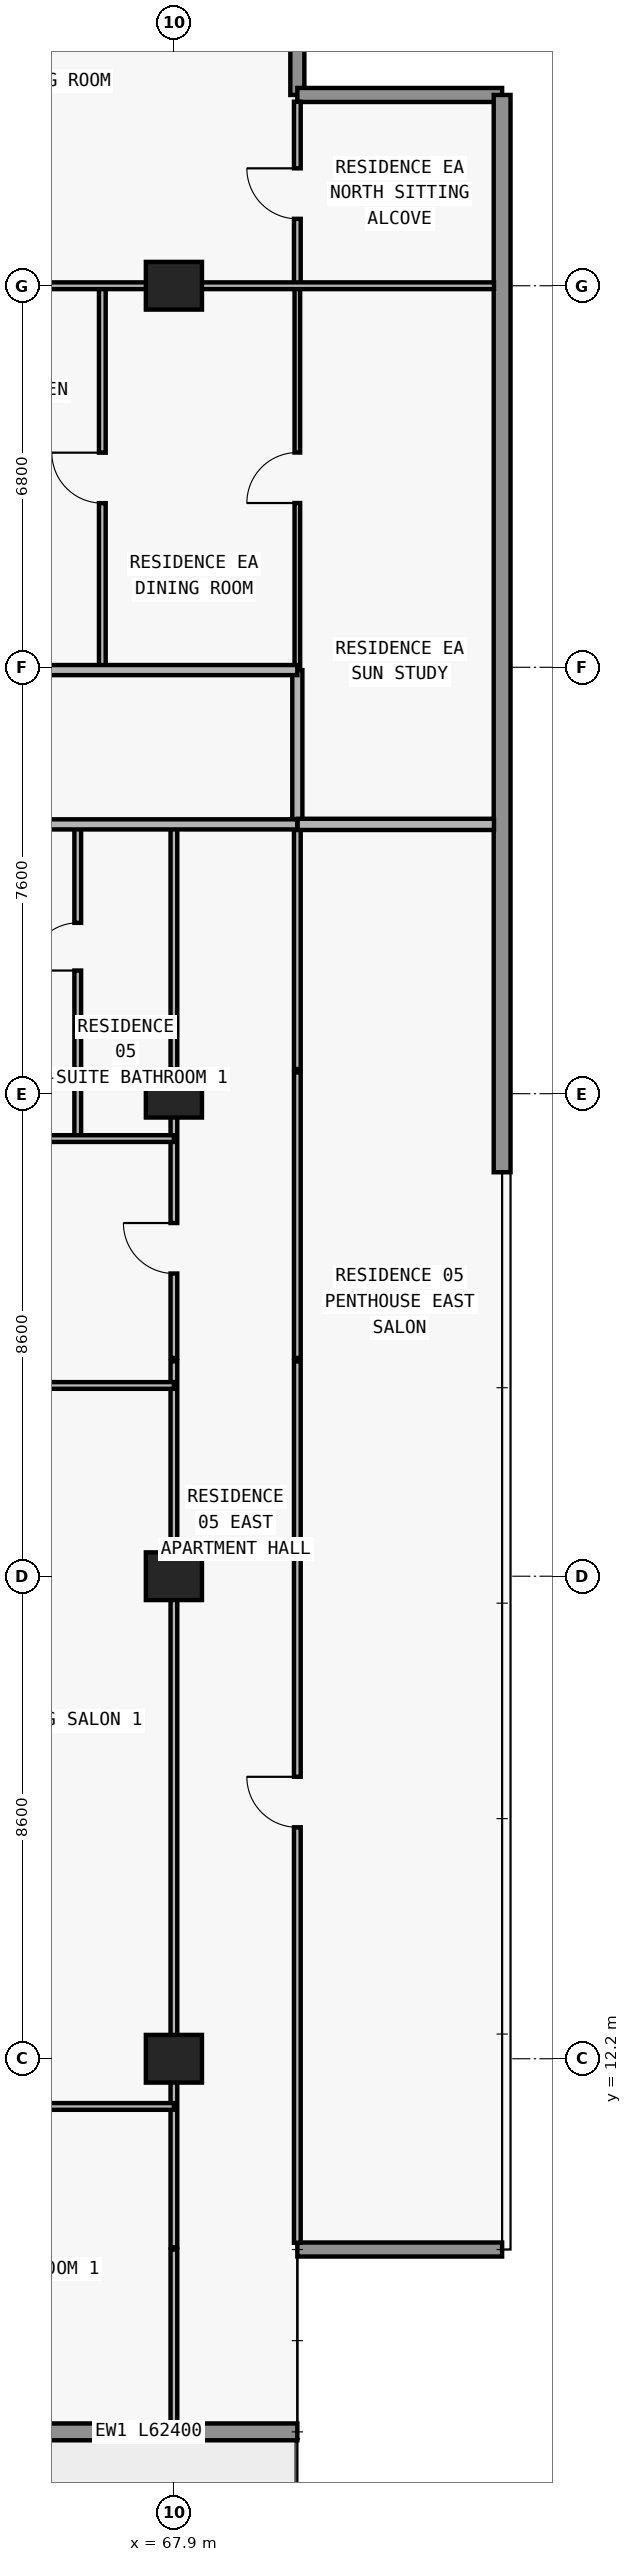
"""IFC4 building model, lengths in metres.
Left out: names, types, materials, properties, quantities, classifications, styles, units other than length and angle.
Written with IfcOpenShell. Run it as: python <this file> out.ifc"""

import sys

from ifc_helpers import new_model, si_unit, direction, frame, frame_2d, origin, origin_2d, place, context, subcontext, project, spatial, rectangle, extrude, element, fill, save


model = new_model("IFC4")
c1 = context("Model", 3, precision=1e-05, world=origin(), true_north=direction((0.0, 1.0)))
c2 = subcontext(c1, "Body", "Model", "MODEL_VIEW")
j1 = project(units=[si_unit("LENGTHUNIT", "METRE"), si_unit("PLANEANGLEUNIT", "RADIAN")], contexts=[c1])
p1 = place(None, origin())
s1 = spatial("IfcSite", under=j1, at=p1, CompositionType="ELEMENT")
p2 = place(p1, origin())
s2 = spatial("IfcBuilding", under=s1, at=p2, CompositionType="ELEMENT")
p3 = place(p2, frame((0.0, 0.0, 148.8)))
s3 = spatial("IfcBuildingStorey", under=s2, at=p3, CompositionType="ELEMENT", Elevation=148.8)
for number, where, z_axis, x_axis in (
    (1, (67.9, 12.2, 0.0), (0.0, 0.0, 1.0), (1.0, 0.0, 0.0)),
    (2, (67.9, 20.8, 0.0), (0.0, 0.0, 1.0), (1.0, 0.0, 0.0)),
    (3, (67.9, 29.4, 0.0), (0.0, 0.0, 1.0), (1.0, 0.0, 0.0)),
    (4, (67.9, 43.8, 0.0), (0.0, 0.0, 1.0), (1.0, 0.0, 0.0)),
):
    element("IfcColumn", number, at=place(p3, frame(where, z_axis=z_axis, x_axis=x_axis)), inside=s3, PredefinedType="COLUMN", context=c2, shape_type="SweptSolid", body=[
        extrude(rectangle(XDim=1.0, YDim=0.85, at=origin_2d()), origin(), (0.0, 0.0, 1.0), 3.0),
    ])
p4 = place(p3, frame((70.1, 5.55, 0.0), z_axis=(0.0, 0.0, 1.0), x_axis=(-1.0, 0.0, 0.0)))
e5 = element("IfcWall", 5, at=p4, inside=s3, PredefinedType="STANDARD", context=c2, shape_type="SweptSolid", body=[
    extrude(rectangle(XDim=62.4, YDim=0.3, at=frame_2d((31.2, 0.0))), origin(), (0.0, 0.0, 1.0), 3.0),
])
p5 = place(p4, frame((57.226, 0.0, 0.0)))
e6 = element("IfcOpeningElement", 6, at=p5, cuts=e5, PredefinedType="OPENING", context=c2, shape_type="SweptSolid", body=[
    extrude(rectangle(XDim=2.0, YDim=2.3, at=frame_2d((1.0, 1.15))), frame((0.0, 0.16, 0.0), z_axis=(0.0, -1.0, 0.0), x_axis=(1.0, 0.0, 0.0)), (0.0, 0.0, 1.0), 0.32),
])
p6 = place(p4, frame((52.926, 0.0, 0.85)))
e7 = element("IfcOpeningElement", 7, at=p6, cuts=e5, PredefinedType="OPENING", context=c2, shape_type="SweptSolid", body=[
    extrude(rectangle(XDim=2.2, YDim=1.55, at=frame_2d((1.1, 0.775))), frame((0.0, 0.16, 0.0), z_axis=(0.0, -1.0, 0.0), x_axis=(1.0, 0.0, 0.0)), (0.0, 0.0, 1.0), 0.32),
])
p7 = place(p4, frame((48.49, 0.0, 0.0)))
e8 = element("IfcOpeningElement", 8, at=p7, cuts=e5, PredefinedType="OPENING", context=c2, shape_type="SweptSolid", body=[
    extrude(rectangle(XDim=2.0, YDim=2.3, at=frame_2d((1.0, 1.15))), frame((0.0, 0.16, 0.0), z_axis=(0.0, -1.0, 0.0), x_axis=(1.0, 0.0, 0.0)), (0.0, 0.0, 1.0), 0.32),
])
p8 = place(p4, frame((44.39, 0.0, 0.85)))
e9 = element("IfcOpeningElement", 9, at=p8, cuts=e5, PredefinedType="OPENING", context=c2, shape_type="SweptSolid", body=[
    extrude(rectangle(XDim=1.8, YDim=1.55, at=frame_2d((0.9, 0.775))), frame((0.0, 0.16, 0.0), z_axis=(0.0, -1.0, 0.0), x_axis=(1.0, 0.0, 0.0)), (0.0, 0.0, 1.0), 0.32),
])
p9 = place(p4, frame((40.426, 0.0, 0.0)))
e10 = element("IfcOpeningElement", 10, at=p9, cuts=e5, PredefinedType="OPENING", context=c2, shape_type="SweptSolid", body=[
    extrude(rectangle(XDim=2.0, YDim=2.3, at=frame_2d((1.0, 1.15))), frame((0.0, 0.16, 0.0), z_axis=(0.0, -1.0, 0.0), x_axis=(1.0, 0.0, 0.0)), (0.0, 0.0, 1.0), 0.32),
])
p10 = place(p4, frame((36.126, 0.0, 0.85)))
e11 = element("IfcOpeningElement", 11, at=p10, cuts=e5, PredefinedType="OPENING", context=c2, shape_type="SweptSolid", body=[
    extrude(rectangle(XDim=2.2, YDim=1.55, at=frame_2d((1.1, 0.775))), frame((0.0, 0.16, 0.0), z_axis=(0.0, -1.0, 0.0), x_axis=(1.0, 0.0, 0.0)), (0.0, 0.0, 1.0), 0.32),
])
p11 = place(p4, frame((32.09, 0.0, 0.0)))
e12 = element("IfcOpeningElement", 12, at=p11, cuts=e5, PredefinedType="OPENING", context=c2, shape_type="SweptSolid", body=[
    extrude(rectangle(XDim=2.0, YDim=2.3, at=frame_2d((1.0, 1.15))), frame((0.0, 0.16, 0.0), z_axis=(0.0, -1.0, 0.0), x_axis=(1.0, 0.0, 0.0)), (0.0, 0.0, 1.0), 0.32),
])
p12 = place(p4, frame((28.21, 0.0, 0.65)))
e13 = element("IfcOpeningElement", 13, at=p12, cuts=e5, PredefinedType="OPENING", context=c2, shape_type="SweptSolid", body=[
    extrude(rectangle(XDim=2.6, YDim=1.85, at=frame_2d((1.3, 0.925))), frame((0.0, 0.16, 0.0), z_axis=(0.0, -1.0, 0.0), x_axis=(1.0, 0.0, 0.0)), (0.0, 0.0, 1.0), 0.32),
])
p13 = place(p4, frame((22.1, 0.0, 0.85)))
e14 = element("IfcOpeningElement", 14, at=p13, cuts=e5, PredefinedType="OPENING", context=c2, shape_type="SweptSolid", body=[
    extrude(rectangle(XDim=2.2, YDim=1.55, at=frame_2d((1.1, 0.775))), frame((0.0, 0.16, 0.0), z_axis=(0.0, -1.0, 0.0), x_axis=(1.0, 0.0, 0.0)), (0.0, 0.0, 1.0), 0.32),
])
p14 = place(p4, frame((16.09, 0.0, 0.0)))
e15 = element("IfcOpeningElement", 15, at=p14, cuts=e5, PredefinedType="OPENING", context=c2, shape_type="SweptSolid", body=[
    extrude(rectangle(XDim=2.0, YDim=2.3, at=frame_2d((1.0, 1.15))), frame((0.0, 0.16, 0.0), z_axis=(0.0, -1.0, 0.0), x_axis=(1.0, 0.0, 0.0)), (0.0, 0.0, 1.0), 0.32),
])
p15 = place(p4, frame((11.41, 0.0, 0.65)))
e16 = element("IfcOpeningElement", 16, at=p15, cuts=e5, PredefinedType="OPENING", context=c2, shape_type="SweptSolid", body=[
    extrude(rectangle(XDim=2.6, YDim=1.85, at=frame_2d((1.3, 0.925))), frame((0.0, 0.16, 0.0), z_axis=(0.0, -1.0, 0.0), x_axis=(1.0, 0.0, 0.0)), (0.0, 0.0, 1.0), 0.32),
])
p16 = place(p4, frame((5.3, 0.0, 0.85)))
e17 = element("IfcOpeningElement", 17, at=p16, cuts=e5, PredefinedType="OPENING", context=c2, shape_type="SweptSolid", body=[
    extrude(rectangle(XDim=2.2, YDim=1.55, at=frame_2d((1.1, 0.775))), frame((0.0, 0.16, 0.0), z_axis=(0.0, -1.0, 0.0), x_axis=(1.0, 0.0, 0.0)), (0.0, 0.0, 1.0), 0.32),
])
p17 = place(p3, frame((70.1, 8.8, 0.0), z_axis=(0.0, 0.0, 1.0), x_axis=(1.0, 0.0, 0.0)))
e18 = element("IfcWall", 18, at=p17, inside=s3, PredefinedType="ELEMENTEDWALL", context=c2, shape_type="SweptSolid", body=[
    extrude(rectangle(XDim=3.65, YDim=0.25, at=frame_2d((1.825, 0.0))), origin(), (0.0, 0.0, 1.0), 3.0),
])
p18 = place(p3, frame((70.1, 50.45, 0.0), z_axis=(0.0, 0.0, 1.0), x_axis=(0.0, -1.0, 0.0)))
e19 = element("IfcWall", 19, at=p18, inside=s3, PredefinedType="ELEMENTEDWALL", context=c2, shape_type="SweptSolid", body=[
    extrude(rectangle(XDim=3.25, YDim=0.25, at=frame_2d((1.625, 0.0))), origin(), (0.0, 0.0, 1.0), 3.0),
])
p19 = place(p3, frame((70.1, 47.2, 0.0), z_axis=(0.0, 0.0, 1.0), x_axis=(1.0, 0.0, 0.0)))
e20 = element("IfcWall", 20, at=p19, inside=s3, PredefinedType="ELEMENTEDWALL", context=c2, shape_type="SweptSolid", body=[
    extrude(rectangle(XDim=3.65, YDim=0.25, at=frame_2d((1.825, 0.0))), origin(), (0.0, 0.0, 1.0), 3.0),
])
p20 = place(p3, frame((73.75, 47.2, 0.0), z_axis=(0.0, 0.0, 1.0), x_axis=(0.0, -1.0, 0.0)))
e21 = element("IfcWall", 21, at=p20, inside=s3, PredefinedType="STANDARD", context=c2, shape_type="SweptSolid", body=[
    extrude(rectangle(XDim=19.2, YDim=0.3, at=frame_2d((9.6, 0.0))), origin(), (0.0, 0.0, 1.0), 3.0),
])
p21 = place(p3, frame((66.186, 28.6, 0.0), z_axis=(0.0, 0.0, 1.0), x_axis=(0.0, 1.0, 0.0)))
e22 = element("IfcWall", 22, at=p21, inside=s3, PredefinedType="PARTITIONING", context=c2, shape_type="SweptSolid", body=[
    extrude(rectangle(XDim=1.18, YDim=0.12, at=frame_2d((0.59, 0.0))), origin(), (0.0, 0.0, 1.0), 3.0),
])
p22 = place(p3, frame((66.186, 29.84, 0.0), z_axis=(0.0, 0.0, 1.0), x_axis=(0.0, 1.0, 0.0)))
e23 = element("IfcWall", 23, at=p22, inside=s3, PredefinedType="PARTITIONING", context=c2, shape_type="SweptSolid", body=[
    extrude(rectangle(XDim=4.36, YDim=0.12, at=frame_2d((2.18, 0.0))), origin(), (0.0, 0.0, 1.0), 3.0),
])
p23 = place(p22, frame((1.755, 0.0, 0.0)))
e24 = element("IfcOpeningElement", 24, at=p23, cuts=e23, PredefinedType="OPENING", context=c2, shape_type="SweptSolid", body=[
    extrude(rectangle(XDim=0.85, YDim=2.1, at=frame_2d((0.425, 1.05))), frame((0.0, 0.07, 0.0), z_axis=(0.0, -1.0, 0.0), x_axis=(1.0, 0.0, 0.0)), (0.0, 0.0, 1.0), 0.14),
])
p24 = place(p3, frame((66.624, 36.95, 0.0), z_axis=(0.0, 0.0, 1.0), x_axis=(0.0, 1.0, 0.0)))
e25 = element("IfcWall", 25, at=p24, inside=s3, PredefinedType="PARTITIONING", context=c2, shape_type="SweptSolid", body=[
    extrude(rectangle(XDim=6.85, YDim=0.12, at=frame_2d((3.425, 0.0))), origin(), (0.0, 0.0, 1.0), 3.0),
])
p25 = place(p24, frame((2.975, 0.0, 0.0)))
e26 = element("IfcOpeningElement", 26, at=p25, cuts=e25, PredefinedType="OPENING", context=c2, shape_type="SweptSolid", body=[
    extrude(rectangle(XDim=0.9, YDim=2.15, at=frame_2d((0.45, 1.075))), frame((0.0, 0.07, 0.0), z_axis=(0.0, -1.0, 0.0), x_axis=(1.0, 0.0, 0.0)), (0.0, 0.0, 1.0), 0.14),
])
p26 = place(p3, frame((67.9, 5.695, 0.0), z_axis=(0.0, 0.0, 1.0), x_axis=(0.0, 1.0, 0.0)))
e27 = element("IfcWall", 27, at=p26, inside=s3, PredefinedType="PARTITIONING", context=c2, shape_type="SweptSolid", body=[
    extrude(rectangle(XDim=3.105, YDim=0.12, at=frame_2d((1.552, 0.0))), origin(), (0.0, 0.0, 1.0), 3.0),
])
p27 = place(p3, frame((67.9, 8.84, 0.0), z_axis=(0.0, 0.0, 1.0), x_axis=(0.0, 1.0, 0.0)))
e28 = element("IfcWall", 28, at=p27, inside=s3, PredefinedType="PARTITIONING", context=c2, shape_type="SweptSolid", body=[
    extrude(rectangle(XDim=15.79, YDim=0.12, at=frame_2d((7.895, 0.0))), origin(), (0.0, 0.0, 1.0), 2.124),
])
p28 = place(p3, frame((67.9, 24.69, 0.0), z_axis=(0.0, 0.0, 1.0), x_axis=(0.0, 1.0, 0.0)))
e29 = element("IfcWall", 29, at=p28, inside=s3, PredefinedType="PARTITIONING", context=c2, shape_type="SweptSolid", body=[
    extrude(rectangle(XDim=5.09, YDim=0.12, at=frame_2d((2.545, 0.0))), origin(), (0.0, 0.0, 1.0), 2.124),
])
p29 = place(p28, frame((1.505, 0.0, 0.0)))
e30 = element("IfcOpeningElement", 30, at=p29, cuts=e29, PredefinedType="OPENING", context=c2, shape_type="SweptSolid", body=[
    extrude(rectangle(XDim=0.9, YDim=2.074, at=frame_2d((0.45, 1.037))), frame((0.0, 0.07, 0.0), z_axis=(0.0, -1.0, 0.0), x_axis=(1.0, 0.0, 0.0)), (0.0, 0.0, 1.0), 0.14),
])
p30 = place(p3, frame((67.9, 29.84, 0.0), z_axis=(0.0, 0.0, 1.0), x_axis=(0.0, 1.0, 0.0)))
e31 = element("IfcWall", 31, at=p30, inside=s3, PredefinedType="PARTITIONING", context=c2, shape_type="SweptSolid", body=[
    extrude(rectangle(XDim=4.36, YDim=0.12, at=frame_2d((2.18, 0.0))), origin(), (0.0, 0.0, 1.0), 2.124),
])
p31 = place(p3, frame((70.1, 8.92, 0.0), z_axis=(0.0, 0.0, 1.0), x_axis=(0.0, 1.0, 0.0)))
e32 = element("IfcWall", 32, at=p31, inside=s3, PredefinedType="PARTITIONING", context=c2, shape_type="SweptSolid", body=[
    extrude(rectangle(XDim=15.71, YDim=0.12, at=frame_2d((7.855, 0.0))), origin(), (0.0, 0.0, 1.0), 3.0),
])
p32 = place(p31, frame((7.405, 0.0, 0.0)))
e33 = element("IfcOpeningElement", 33, at=p32, cuts=e32, PredefinedType="OPENING", context=c2, shape_type="SweptSolid", body=[
    extrude(rectangle(XDim=0.9, YDim=2.15, at=frame_2d((0.45, 1.075))), frame((0.0, 0.07, 0.0), z_axis=(0.0, -1.0, 0.0), x_axis=(1.0, 0.0, 0.0)), (0.0, 0.0, 1.0), 0.14),
])
p33 = place(p3, frame((70.1, 24.69, 0.0), z_axis=(0.0, 0.0, 1.0), x_axis=(0.0, 1.0, 0.0)))
e34 = element("IfcWall", 34, at=p33, inside=s3, PredefinedType="PARTITIONING", context=c2, shape_type="SweptSolid", body=[
    extrude(rectangle(XDim=5.09, YDim=0.12, at=frame_2d((2.545, 0.0))), origin(), (0.0, 0.0, 1.0), 3.0),
])
p34 = place(p3, frame((70.1, 29.84, 0.0), z_axis=(0.0, 0.0, 1.0), x_axis=(0.0, 1.0, 0.0)))
e35 = element("IfcWall", 35, at=p34, inside=s3, PredefinedType="PARTITIONING", context=c2, shape_type="SweptSolid", body=[
    extrude(rectangle(XDim=4.36, YDim=0.12, at=frame_2d((2.18, 0.0))), origin(), (0.0, 0.0, 1.0), 3.0),
])
p35 = place(p3, frame((70.1, 34.205, 0.0), z_axis=(0.0, 0.0, 1.0), x_axis=(0.0, 1.0, 0.0)))
e36 = element("IfcWall", 36, at=p35, inside=s3, PredefinedType="PARTITIONING", context=c2, shape_type="SweptSolid", body=[
    extrude(rectangle(XDim=2.745, YDim=0.18, at=frame_2d((1.373, 0.0))), origin(), (0.0, 0.0, 1.0), 3.0),
])
p36 = place(p3, frame((70.1, 36.955, 0.0), z_axis=(0.0, 0.0, 1.0), x_axis=(0.0, 1.0, 0.0)))
e37 = element("IfcWall", 37, at=p36, inside=s3, PredefinedType="MOVABLE", context=c2, shape_type="SweptSolid", body=[
    extrude(rectangle(XDim=6.845, YDim=0.1, at=frame_2d((3.422, 0.0))), origin(), (0.0, 0.0, 1.0), 3.0),
])
p37 = place(p36, frame((2.972, 0.0, 0.0)))
e38 = element("IfcOpeningElement", 38, at=p37, cuts=e37, PredefinedType="OPENING", context=c2, shape_type="SweptSolid", body=[
    extrude(rectangle(XDim=0.9, YDim=2.15, at=frame_2d((0.45, 1.075))), frame((0.0, 0.06, 0.0), z_axis=(0.0, -1.0, 0.0), x_axis=(1.0, 0.0, 0.0)), (0.0, 0.0, 1.0), 0.12),
])
p38 = place(p3, frame((70.1, 43.805, 0.0), z_axis=(0.0, 0.0, 1.0), x_axis=(0.0, 1.0, 0.0)))
e39 = element("IfcWall", 39, at=p38, inside=s3, PredefinedType="PARTITIONING", context=c2, shape_type="SweptSolid", body=[
    extrude(rectangle(XDim=3.275, YDim=0.12, at=frame_2d((1.638, 0.0))), origin(), (0.0, 0.0, 1.0), 3.0),
])
p39 = place(p38, frame((1.188, 0.0, 0.0)))
e40 = element("IfcOpeningElement", 40, at=p39, cuts=e39, PredefinedType="OPENING", context=c2, shape_type="SweptSolid", body=[
    extrude(rectangle(XDim=0.9, YDim=2.15, at=frame_2d((0.45, 1.075))), frame((0.0, 0.07, 0.0), z_axis=(0.0, -1.0, 0.0), x_axis=(1.0, 0.0, 0.0)), (0.0, 0.0, 1.0), 0.14),
])
p40 = place(p3, frame((59.55, 11.35, 0.0), z_axis=(0.0, 0.0, 1.0), x_axis=(1.0, 0.0, 0.0)))
e41 = element("IfcWall", 41, at=p40, inside=s3, PredefinedType="PARTITIONING", context=c2, shape_type="SweptSolid", body=[
    extrude(rectangle(XDim=8.35, YDim=0.12, at=frame_2d((4.175, 0.0))), origin(), (0.0, 0.0, 1.0), 3.0),
])
p41 = place(p40, frame((3.725, 0.0, 0.0)))
e42 = element("IfcOpeningElement", 42, at=p41, cuts=e41, PredefinedType="OPENING", context=c2, shape_type="SweptSolid", body=[
    extrude(rectangle(XDim=0.9, YDim=2.15, at=frame_2d((0.45, 1.075))), frame((0.0, 0.07, 0.0), z_axis=(0.0, -1.0, 0.0), x_axis=(1.0, 0.0, 0.0)), (0.0, 0.0, 1.0), 0.14),
])
p42 = place(p3, frame((59.55, 24.2, 0.0), z_axis=(0.0, 0.0, 1.0), x_axis=(1.0, 0.0, 0.0)))
e43 = element("IfcWall", 43, at=p42, inside=s3, PredefinedType="PARTITIONING", context=c2, shape_type="SweptSolid", body=[
    extrude(rectangle(XDim=8.35, YDim=0.12, at=frame_2d((4.175, 0.0))), origin(), (0.0, 0.0, 1.0), 3.0),
])
p43 = place(p42, frame((3.725, 0.0, 0.0)))
e44 = element("IfcOpeningElement", 44, at=p43, cuts=e43, PredefinedType="OPENING", context=c2, shape_type="SweptSolid", body=[
    extrude(rectangle(XDim=0.9, YDim=2.15, at=frame_2d((0.45, 1.075))), frame((0.0, 0.07, 0.0), z_axis=(0.0, -1.0, 0.0), x_axis=(1.0, 0.0, 0.0)), (0.0, 0.0, 1.0), 0.14),
])
p44 = place(p3, frame((59.55, 28.6, 0.0), z_axis=(0.0, 0.0, 1.0), x_axis=(1.0, 0.0, 0.0)))
e45 = element("IfcWall", 45, at=p44, inside=s3, PredefinedType="PARTITIONING", context=c2, shape_type="SweptSolid", body=[
    extrude(rectangle(XDim=8.35, YDim=0.12, at=frame_2d((4.175, 0.0))), origin(), (0.0, 0.0, 1.0), 3.0),
])
p45 = place(p44, frame((2.868, 0.0, 0.0)))
e46 = element("IfcOpeningElement", 46, at=p45, cuts=e45, PredefinedType="OPENING", context=c2, shape_type="SweptSolid", body=[
    extrude(rectangle(XDim=0.9, YDim=2.15, at=frame_2d((0.45, 1.075))), frame((0.0, 0.07, 0.0), z_axis=(0.0, -1.0, 0.0), x_axis=(1.0, 0.0, 0.0)), (0.0, 0.0, 1.0), 0.14),
])
p46 = place(p3, frame((59.55, 34.2, 0.0), z_axis=(0.0, 0.0, 1.0), x_axis=(1.0, 0.0, 0.0)))
e47 = element("IfcWall", 47, at=p46, inside=s3, PredefinedType="PARTITIONING", context=c2, shape_type="SweptSolid", body=[
    extrude(rectangle(XDim=10.55, YDim=0.18, at=frame_2d((5.275, 0.0))), origin(), (0.0, 0.0, 1.0), 3.0),
])
p47 = place(p3, frame((70.105, 34.2, 0.0), z_axis=(0.0, 0.0, 1.0), x_axis=(1.0, 0.0, 0.0)))
e48 = element("IfcWall", 48, at=p47, inside=s3, PredefinedType="PARTITIONING", context=c2, shape_type="SweptSolid", body=[
    extrude(rectangle(XDim=3.5, YDim=0.2, at=frame_2d((1.75, 0.0))), origin(), (0.0, 0.0, 1.0), 3.0),
])
p48 = place(p3, frame((59.955, 36.95, 0.0), z_axis=(0.0, 0.0, 1.0), x_axis=(1.0, 0.0, 0.0)))
e49 = element("IfcWall", 49, at=p48, inside=s3, PredefinedType="PARTITIONING", context=c2, shape_type="SweptSolid", body=[
    extrude(rectangle(XDim=10.145, YDim=0.18, at=frame_2d((5.073, 0.0))), origin(), (0.0, 0.0, 1.0), 3.0),
])
p49 = place(p48, frame((3.957, 0.0, 0.0)))
e50 = element("IfcOpeningElement", 50, at=p49, cuts=e49, PredefinedType="OPENING", context=c2, shape_type="SweptSolid", body=[
    extrude(rectangle(XDim=1.0, YDim=2.2, at=frame_2d((0.5, 1.1))), frame((0.0, 0.1, 0.0), z_axis=(0.0, -1.0, 0.0), x_axis=(1.0, 0.0, 0.0)), (0.0, 0.0, 1.0), 0.2),
])
p50 = place(p3, frame((59.945, 43.8, 0.0), z_axis=(0.0, 0.0, 1.0), x_axis=(1.0, 0.0, 0.0)))
e51 = element("IfcWall", 51, at=p50, inside=s3, PredefinedType="PARTITIONING", context=c2, shape_type="SweptSolid", body=[
    extrude(rectangle(XDim=13.66, YDim=0.12, at=frame_2d((6.83, 0.0))), origin(), (0.0, 0.0, 1.0), 2.289),
])
p51 = place(p50, frame((4.017, 0.0, 0.0)))
e52 = element("IfcOpeningElement", 52, at=p51, cuts=e51, PredefinedType="OPENING", context=c2, shape_type="SweptSolid", body=[
    extrude(rectangle(XDim=0.9, YDim=2.15, at=frame_2d((0.45, 1.075))), frame((0.0, 0.07, 0.0), z_axis=(0.0, -1.0, 0.0), x_axis=(1.0, 0.0, 0.0)), (0.0, 0.0, 1.0), 0.14),
])
p52 = place(p50, frame((0.702, 0.0, 0.0)))
e53 = element("IfcOpeningElement", 53, at=p52, cuts=e51, PredefinedType="OPENING", context=c2, shape_type="SweptSolid", body=[
    extrude(rectangle(XDim=0.85, YDim=2.1, at=frame_2d((0.425, 1.05))), frame((0.0, 0.07, 0.0), z_axis=(0.0, -1.0, 0.0), x_axis=(1.0, 0.0, 0.0)), (0.0, 0.0, 1.0), 0.14),
])
p53 = place(p23, origin())
e54 = element("IfcDoor", 54, at=p53, inside=s3, OperationType="SINGLE_SWING_LEFT", PredefinedType="DOOR", context=c2, shape_type="SweptSolid", body=[
    extrude(rectangle(XDim=0.85, YDim=2.1, at=frame_2d((0.425, 1.05))), frame((0.0, 0.025, 0.0), z_axis=(0.0, -1.0, 0.0), x_axis=(1.0, 0.0, 0.0)), (0.0, 0.0, 1.0), 0.05),
])
fill(e24, e54)
p54 = place(p29, origin())
e55 = element("IfcDoor", 55, at=p54, inside=s3, OperationType="SINGLE_SWING_RIGHT", PredefinedType="DOOR", context=c2, shape_type="SweptSolid", body=[
    extrude(rectangle(XDim=0.9, YDim=2.074, at=frame_2d((0.45, 1.037))), frame((0.0, 0.025, 0.0), z_axis=(0.0, -1.0, 0.0), x_axis=(1.0, 0.0, 0.0)), (0.0, 0.0, 1.0), 0.05),
])
fill(e30, e55)
p55 = place(p32, origin())
e56 = element("IfcDoor", 56, at=p55, inside=s3, OperationType="SINGLE_SWING_RIGHT", PredefinedType="DOOR", context=c2, shape_type="SweptSolid", body=[
    extrude(rectangle(XDim=0.9, YDim=2.15, at=frame_2d((0.45, 1.075))), frame((0.0, 0.025, 0.0), z_axis=(0.0, -1.0, 0.0), x_axis=(1.0, 0.0, 0.0)), (0.0, 0.0, 1.0), 0.05),
])
fill(e33, e56)
p56 = place(p25, origin())
e57 = element("IfcDoor", 57, at=p56, inside=s3, OperationType="SINGLE_SWING_RIGHT", PredefinedType="DOOR", context=c2, shape_type="SweptSolid", body=[
    extrude(rectangle(XDim=0.9, YDim=2.15, at=frame_2d((0.45, 1.075))), frame((0.0, 0.025, 0.0), z_axis=(0.0, -1.0, 0.0), x_axis=(1.0, 0.0, 0.0)), (0.0, 0.0, 1.0), 0.05),
])
fill(e26, e57)
p57 = place(p37, origin())
e58 = element("IfcDoor", 58, at=p57, inside=s3, OperationType="SINGLE_SWING_LEFT", PredefinedType="DOOR", context=c2, shape_type="SweptSolid", body=[
    extrude(rectangle(XDim=0.9, YDim=2.15, at=frame_2d((0.45, 1.075))), frame((0.0, 0.025, 0.0), z_axis=(0.0, -1.0, 0.0), x_axis=(1.0, 0.0, 0.0)), (0.0, 0.0, 1.0), 0.05),
])
fill(e38, e58)
p58 = place(p39, origin())
e59 = element("IfcDoor", 59, at=p58, inside=s3, OperationType="SINGLE_SWING_RIGHT", PredefinedType="DOOR", context=c2, shape_type="SweptSolid", body=[
    extrude(rectangle(XDim=0.9, YDim=2.15, at=frame_2d((0.45, 1.075))), frame((0.0, 0.025, 0.0), z_axis=(0.0, -1.0, 0.0), x_axis=(1.0, 0.0, 0.0)), (0.0, 0.0, 1.0), 0.05),
])
fill(e40, e59)
save(model, sys.argv[1])
